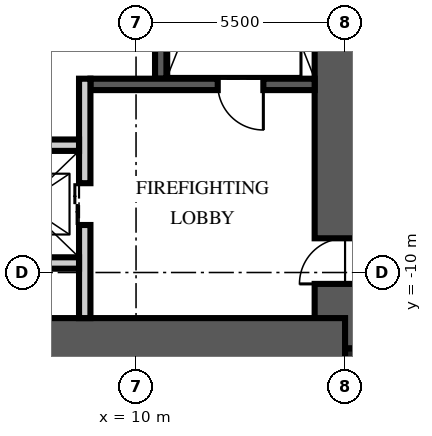
"""IFC4 building model, lengths in metres.
Left out: names, types, materials, properties, quantities, classifications, styles, units other than length and angle.
Written with IfcOpenShell. Run it as: python <this file> out.ifc"""

import sys

from ifc_helpers import new_model, si_unit, direction, frame, frame_2d, origin, origin_2d, place, context, subcontext, project, spatial, rectangle, extrude, element, fill, save


model = new_model("IFC4")
c1 = context("Model", 3, precision=1e-05, world=origin(), true_north=direction((0.0, 1.0)))
c2 = subcontext(c1, "Body", "Model", "MODEL_VIEW")
j1 = project(units=[si_unit("LENGTHUNIT", "METRE"), si_unit("PLANEANGLEUNIT", "RADIAN")], contexts=[c1])
p1 = place(None, origin())
s1 = spatial("IfcSite", under=j1, at=p1, CompositionType="ELEMENT")
p2 = place(p1, origin())
s2 = spatial("IfcBuilding", under=s1, at=p2, CompositionType="ELEMENT")
p3 = place(p2, frame((0.0, 0.0, 278.25)))
s3 = spatial("IfcBuildingStorey", under=s2, at=p3, CompositionType="ELEMENT", Elevation=278.25)
p4 = place(p3, frame((15.5, -12.0, -0.35), z_axis=(0.0, 0.0, 1.0), x_axis=(0.0, 1.0, 0.0)))
e1 = element("IfcWall", 1, at=p4, inside=s3, PredefinedType="SHEAR", context=c2, shape_type="SweptSolid", body=[
    extrude(rectangle(XDim=24.0, YDim=1.6, at=frame_2d((12.0, 0.0))), origin(), (0.0, 0.0, 1.0), 7.6),
])
p5 = place(p4, frame((1.7, 0.0, 0.35)))
e2 = element("IfcOpeningElement", 2, at=p5, cuts=e1, PredefinedType="OPENING", context=c2, shape_type="SweptSolid", body=[
    extrude(rectangle(XDim=1.2, YDim=2.1, at=frame_2d((0.6, 1.05))), frame((0.0, 0.81, 0.0), z_axis=(0.0, -1.0, 0.0), x_axis=(1.0, 0.0, 0.0)), (0.0, 0.0, 1.0), 1.62),
])
p6 = place(p4, frame((21.1, 0.0, 0.35)))
e3 = element("IfcOpeningElement", 3, at=p6, cuts=e1, PredefinedType="OPENING", context=c2, shape_type="SweptSolid", body=[
    extrude(rectangle(XDim=1.8, YDim=2.1, at=frame_2d((0.9, 1.05))), frame((0.0, 0.81, 0.0), z_axis=(0.0, -1.0, 0.0), x_axis=(1.0, 0.0, 0.0)), (0.0, 0.0, 1.0), 1.62),
])
p7 = place(p3, frame((-15.5, -12.0, -0.35), z_axis=(0.0, 0.0, 1.0), x_axis=(1.0, 0.0, 0.0)))
e4 = element("IfcWall", 4, at=p7, inside=s3, PredefinedType="SHEAR", context=c2, shape_type="SweptSolid", body=[
    extrude(rectangle(XDim=31.0, YDim=1.6, at=frame_2d((15.5, 0.0))), origin(), (0.0, 0.0, 1.0), 7.6),
])
p8 = place(p3, frame((15.9, -12.4, -0.35), z_axis=(0.0, 0.0, 1.0), x_axis=(1.0, 0.0, 0.0)))
e5 = element("IfcColumn", 5, at=p8, inside=s3, PredefinedType="COLUMN", context=c2, shape_type="SweptSolid", body=[
    extrude(rectangle(XDim=0.8, YDim=0.8, at=origin_2d()), origin(), (0.0, 0.0, 1.0), 7.6),
])
p9 = place(p3, frame((10.65, -4.9, 0.0), z_axis=(0.0, 0.0, 1.0), x_axis=(0.0, 1.0, 0.0)))
e6 = element("IfcWall", 6, at=p9, inside=s3, PredefinedType="SOLIDWALL", context=c2, shape_type="SweptSolid", body=[
    extrude(rectangle(XDim=10.1, YDim=0.3, at=frame_2d((5.05, 0.0))), origin(), (0.0, 0.0, 1.0), 7.25),
])
p10 = place(p3, frame((14.7, -5.05, 0.0), z_axis=(0.0, 0.0, 1.0), x_axis=(-1.0, 0.0, 0.0)))
e7 = element("IfcWall", 7, at=p10, inside=s3, PredefinedType="SOLIDWALL", context=c2, shape_type="SweptSolid", body=[
    extrude(rectangle(XDim=5.9, YDim=0.3, at=frame_2d((2.95, 0.0))), origin(), (0.0, 0.0, 1.0), 7.25),
])
p11 = place(p10, frame((1.35, 0.0, 0.0)))
e8 = element("IfcOpeningElement", 8, at=p11, cuts=e7, PredefinedType="OPENING", context=c2, shape_type="SweptSolid", body=[
    extrude(rectangle(XDim=1.2, YDim=2.1, at=frame_2d((0.6, 1.05))), frame((0.0, 0.16, 0.0), z_axis=(0.0, -1.0, 0.0), x_axis=(1.0, 0.0, 0.0)), (0.0, 0.0, 1.0), 0.32),
])
p12 = place(p3, frame((8.65, -11.2, 0.0), z_axis=(0.0, 0.0, 1.0), x_axis=(0.0, 1.0, 0.0)))
e9 = element("IfcWall", 9, at=p12, inside=s3, PredefinedType="PARTITIONING", context=c2, shape_type="SweptSolid", body=[
    extrude(rectangle(XDim=6.3, YDim=0.3, at=frame_2d((3.15, 0.0))), origin(), (0.0, 0.0, 1.0), 7.25),
])
p13 = place(p12, frame((2.45, 0.0, 0.0)))
e10 = element("IfcOpeningElement", 10, at=p13, cuts=e9, PredefinedType="OPENING", context=c2, shape_type="SweptSolid", body=[
    extrude(rectangle(XDim=1.1, YDim=2.1, at=frame_2d((0.55, 1.05))), frame((0.0, 0.16, 0.0), z_axis=(0.0, -1.0, 0.0), x_axis=(1.0, 0.0, 0.0)), (0.0, 0.0, 1.0), 0.32),
])
p14 = place(p3, frame((-8.5, -6.65, 0.0), z_axis=(0.0, 0.0, 1.0), x_axis=(1.0, 0.0, 0.0)))
e11 = element("IfcWall", 11, at=p14, inside=s3, PredefinedType="PARTITIONING", context=c2, shape_type="SweptSolid", body=[
    extrude(rectangle(XDim=17.0, YDim=0.3, at=frame_2d((8.5, 0.0))), origin(), (0.0, 0.0, 1.0), 7.25),
])
p15 = place(p14, frame((7.8, 0.0, 0.0)))
e12 = element("IfcOpeningElement", 12, at=p15, cuts=e11, PredefinedType="OPENING", context=c2, shape_type="SweptSolid", body=[
    extrude(rectangle(XDim=1.3, YDim=2.4, at=frame_2d((0.65, 1.2))), frame((0.0, 0.16, 0.0), z_axis=(0.0, -1.0, 0.0), x_axis=(1.0, 0.0, 0.0)), (0.0, 0.0, 1.0), 0.32),
])
p16 = place(p14, frame((5.65, 0.0, 0.0)))
e13 = element("IfcOpeningElement", 13, at=p16, cuts=e11, PredefinedType="OPENING", context=c2, shape_type="SweptSolid", body=[
    extrude(rectangle(XDim=0.9, YDim=2.1, at=frame_2d((0.45, 1.05))), frame((0.0, 0.16, 0.0), z_axis=(0.0, -1.0, 0.0), x_axis=(1.0, 0.0, 0.0)), (0.0, 0.0, 1.0), 0.32),
])
p17 = place(p14, frame((10.4, 0.0, 0.0)))
e14 = element("IfcOpeningElement", 14, at=p17, cuts=e11, PredefinedType="OPENING", context=c2, shape_type="SweptSolid", body=[
    extrude(rectangle(XDim=0.9, YDim=2.1, at=frame_2d((0.45, 1.05))), frame((0.0, 0.16, 0.0), z_axis=(0.0, -1.0, 0.0), x_axis=(1.0, 0.0, 0.0)), (0.0, 0.0, 1.0), 0.32),
])
p18 = place(p3, frame((5.6, -9.75, 0.0), z_axis=(0.0, 0.0, 1.0), x_axis=(1.0, 0.0, 0.0)))
e15 = element("IfcWall", 15, at=p18, inside=s3, PredefinedType="PARTITIONING", context=c2, shape_type="SweptSolid", body=[
    extrude(rectangle(XDim=2.9, YDim=0.3, at=frame_2d((1.45, 0.0))), origin(), (0.0, 0.0, 1.0), 7.25),
])
p19 = place(p11, origin())
e16 = element("IfcDoor", 16, at=p19, inside=s3, OperationType="SINGLE_SWING_LEFT", PredefinedType="DOOR", context=c2, shape_type="SweptSolid", body=[
    extrude(rectangle(XDim=1.2, YDim=2.1, at=frame_2d((0.6, 1.05))), frame((0.0, 0.025, 0.0), z_axis=(0.0, -1.0, 0.0), x_axis=(1.0, 0.0, 0.0)), (0.0, 0.0, 1.0), 0.05),
])
fill(e8, e16)
p20 = place(p5, origin())
e17 = element("IfcDoor", 17, at=p20, inside=s3, OperationType="SINGLE_SWING_LEFT", PredefinedType="DOOR", context=c2, shape_type="SweptSolid", body=[
    extrude(rectangle(XDim=1.2, YDim=2.1, at=frame_2d((0.6, 1.05))), frame((0.0, 0.025, 0.0), z_axis=(0.0, -1.0, 0.0), x_axis=(1.0, 0.0, 0.0)), (0.0, 0.0, 1.0), 0.05),
])
fill(e2, e17)
p21 = place(p13, origin())
e18 = element("IfcDoor", 18, at=p21, inside=s3, OperationType="DOUBLE_DOOR_SLIDING", PredefinedType="DOOR", context=c2, shape_type="SweptSolid", body=[
    extrude(rectangle(XDim=1.1, YDim=2.1, at=frame_2d((0.55, 1.05))), frame((0.0, 0.025, 0.0), z_axis=(0.0, -1.0, 0.0), x_axis=(1.0, 0.0, 0.0)), (0.0, 0.0, 1.0), 0.05),
])
fill(e10, e18)
save(model, sys.argv[1])
